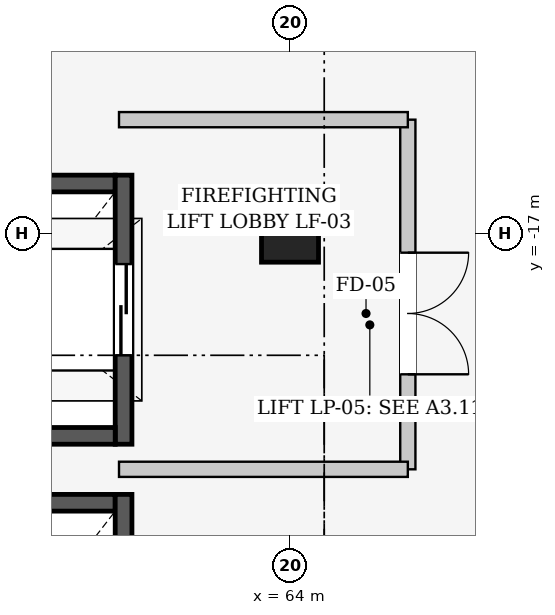
"""IFC4 building model, lengths in metres.
Left out: names, types, materials, properties, quantities, classifications, styles, units other than length and angle.
Written with IfcOpenShell. Run it as: python <this file> out.ifc"""

import sys

from ifc_helpers import new_model, si_unit, direction, frame, frame_2d, origin, origin_2d, place, context, subcontext, project, spatial, rectangle, extrude, element, fill, save


model = new_model("IFC4")
c1 = context("Model", 3, precision=1e-05, world=origin(), true_north=direction((0.0, 1.0)))
c2 = subcontext(c1, "Body", "Model", "MODEL_VIEW")
j1 = project(units=[si_unit("LENGTHUNIT", "METRE"), si_unit("PLANEANGLEUNIT", "RADIAN")], contexts=[c1])
p1 = place(None, origin())
s1 = spatial("IfcSite", under=j1, at=p1, CompositionType="ELEMENT")
p2 = place(p1, origin())
s2 = spatial("IfcBuilding", under=s1, at=p2, CompositionType="ELEMENT")
p3 = place(p2, frame((0.0, 0.0, 21.0)))
s3 = spatial("IfcBuildingStorey", under=s2, at=p3, CompositionType="ELEMENT", Elevation=21.0)
p4 = place(p3, frame((64.0, -17.0, 0.0), z_axis=(0.0, 0.0, 1.0), x_axis=(1.0, 0.0, 0.0)))
e1 = element("IfcColumn", 1, at=p4, inside=s3, PredefinedType="COLUMN", context=c2, shape_type="SweptSolid", body=[
    extrude(rectangle(XDim=0.75, YDim=0.75, at=origin_2d()), origin(), (0.0, 0.0, 1.0), 5.4),
])
p5 = place(p3, frame((59.3, -16.34, 0.0), z_axis=(0.0, 0.0, 1.0), x_axis=(1.0, 0.0, 0.0)))
e2 = element("IfcWall", 2, at=p5, inside=s3, PredefinedType="SHEAR", context=c2, shape_type="SweptSolid", body=[
    extrude(rectangle(XDim=2.4, YDim=0.22, at=frame_2d((1.2, 0.0))), origin(), (0.0, 0.0, 1.0), 5.4),
])
p6 = place(p3, frame((61.81, -16.23, 0.0), z_axis=(0.0, 0.0, 1.0), x_axis=(0.0, -1.0, 0.0)))
e3 = element("IfcWall", 3, at=p6, inside=s3, PredefinedType="SHEAR", context=c2, shape_type="SweptSolid", body=[
    extrude(rectangle(XDim=3.54, YDim=0.22, at=frame_2d((1.77, 0.0))), origin(), (0.0, 0.0, 1.0), 5.4),
])
p7 = place(p6, frame((1.17, 0.0, 0.0)))
e4 = element("IfcOpeningElement", 4, at=p7, cuts=e3, PredefinedType="OPENING", context=c2, shape_type="SweptSolid", body=[
    extrude(rectangle(XDim=1.2, YDim=2.2, at=frame_2d((0.6, 1.1))), frame((0.0, 0.12, 0.0), z_axis=(0.0, -1.0, 0.0), x_axis=(1.0, 0.0, 0.0)), (0.0, 0.0, 1.0), 0.24),
])
for number, where, z_axis, x_axis in (
    (5, (61.7, -19.66, 0.0), (0.0, 0.0, 1.0), (-1.0, 0.0, 0.0)),
    (6, (59.3, -20.54, 0.0), (0.0, 0.0, 1.0), (1.0, 0.0, 0.0)),
):
    element("IfcWall", number, at=place(p3, frame(where, z_axis=z_axis, x_axis=x_axis)), inside=s3, PredefinedType="SHEAR", context=c2, shape_type="SweptSolid", body=[
        extrude(rectangle(XDim=2.4, YDim=0.22, at=frame_2d((1.2, 0.0))), origin(), (0.0, 0.0, 1.0), 5.4),
    ])
p8 = place(p3, frame((61.81, -20.43, 0.0), z_axis=(0.0, 0.0, 1.0), x_axis=(0.0, -1.0, 0.0)))
e7 = element("IfcWall", 7, at=p8, inside=s3, PredefinedType="SHEAR", context=c2, shape_type="SweptSolid", body=[
    extrude(rectangle(XDim=3.54, YDim=0.22, at=frame_2d((1.77, 0.0))), origin(), (0.0, 0.0, 1.0), 5.4),
])
p9 = place(p8, frame((1.22, 0.0, 0.0)))
e8 = element("IfcOpeningElement", 8, at=p9, cuts=e7, PredefinedType="OPENING", context=c2, shape_type="SweptSolid", body=[
    extrude(rectangle(XDim=1.1, YDim=2.2, at=frame_2d((0.55, 1.1))), frame((0.0, 0.12, 0.0), z_axis=(0.0, -1.0, 0.0), x_axis=(1.0, 0.0, 0.0)), (0.0, 0.0, 1.0), 0.24),
])
p10 = place(p3, frame((65.55, -15.5, 0.0), z_axis=(0.0, 0.0, 1.0), x_axis=(0.0, -1.0, 0.0)))
e9 = element("IfcWall", 9, at=p10, inside=s3, PredefinedType="PARTITIONING", context=c2, shape_type="SweptSolid", body=[
    extrude(rectangle(XDim=4.6, YDim=0.2, at=frame_2d((2.3, 0.0))), origin(), (0.0, 0.0, 1.0), 4.145),
])
p11 = place(p10, frame((1.75, 0.0, 0.0)))
e10 = element("IfcOpeningElement", 10, at=p11, cuts=e9, PredefinedType="OPENING", context=c2, shape_type="SweptSolid", body=[
    extrude(rectangle(XDim=1.6, YDim=2.2, at=frame_2d((0.8, 1.1))), frame((0.0, 0.11, 0.0), z_axis=(0.0, -1.0, 0.0), x_axis=(1.0, 0.0, 0.0)), (0.0, 0.0, 1.0), 0.22),
])
for number, where, z_axis, x_axis in (
    (11, (61.75, -15.5, 0.0), (0.0, 0.0, 1.0), (1.0, 0.0, 0.0)),
    (12, (65.55, -20.1, 0.0), (0.0, 0.0, 1.0), (-1.0, 0.0, 0.0)),
):
    element("IfcWall", number, at=place(p3, frame(where, z_axis=z_axis, x_axis=x_axis)), inside=s3, PredefinedType="PARTITIONING", context=c2, shape_type="SweptSolid", body=[
        extrude(rectangle(XDim=3.8, YDim=0.2, at=frame_2d((1.9, 0.0))), origin(), (0.0, 0.0, 1.0), 4.445),
    ])
p12 = place(p7, origin())
e13 = element("IfcDoor", 13, at=p12, inside=s3, OperationType="SLIDING_TO_LEFT", PredefinedType="DOOR", context=c2, shape_type="SweptSolid", body=[
    extrude(rectangle(XDim=1.2, YDim=2.2, at=frame_2d((0.6, 1.1))), frame((0.0, 0.025, 0.0), z_axis=(0.0, -1.0, 0.0), x_axis=(1.0, 0.0, 0.0)), (0.0, 0.0, 1.0), 0.05),
])
fill(e4, e13)
p13 = place(p11, origin())
e14 = element("IfcDoor", 14, at=p13, inside=s3, OperationType="DOUBLE_DOOR_SINGLE_SWING", PredefinedType="DOOR", context=c2, shape_type="SweptSolid", body=[
    extrude(rectangle(XDim=1.6, YDim=2.2, at=frame_2d((0.8, 1.1))), frame((0.0, 0.025, 0.0), z_axis=(0.0, -1.0, 0.0), x_axis=(1.0, 0.0, 0.0)), (0.0, 0.0, 1.0), 0.05),
])
fill(e10, e14)
save(model, sys.argv[1])
